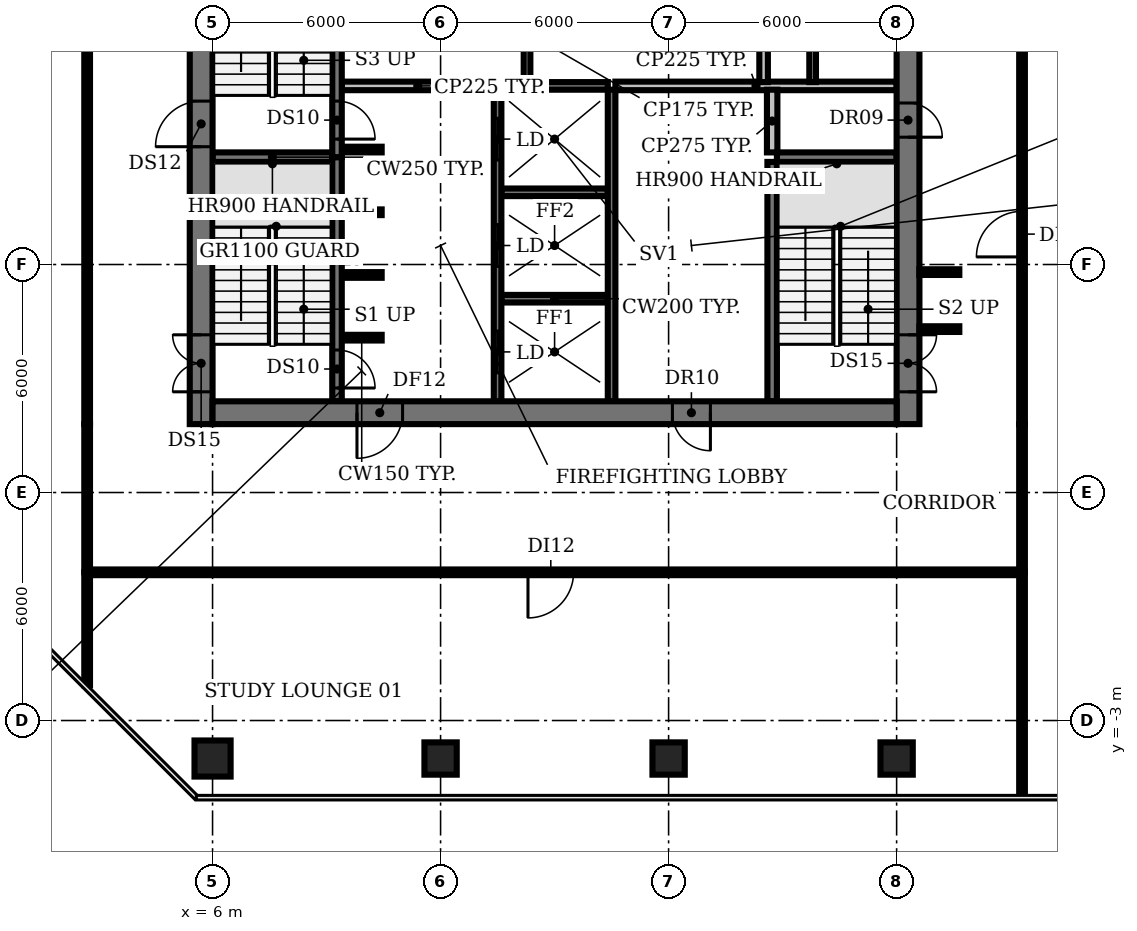
"""IFC4 building model, lengths in metres.
Left out: names, types, materials, properties, quantities, classifications, styles, units other than length and angle.
Written with IfcOpenShell. Run it as: python <this file> out.ifc"""

import sys

from ifc_helpers import new_model, si_unit, direction, frame, frame_2d, origin, origin_2d, place, context, subcontext, project, spatial, rectangle, circle, extrude, element, fill, save


model = new_model("IFC4")
c1 = context("Model", 3, precision=1e-05, world=origin(), true_north=direction((0.0, 1.0)))
c2 = subcontext(c1, "Body", "Model", "MODEL_VIEW")
j1 = project(units=[si_unit("LENGTHUNIT", "METRE"), si_unit("PLANEANGLEUNIT", "RADIAN")], contexts=[c1])
p1 = place(None, origin())
s1 = spatial("IfcSite", under=j1, at=p1, CompositionType="ELEMENT")
p2 = place(p1, origin())
s2 = spatial("IfcBuilding", under=s1, at=p2, CompositionType="ELEMENT")
p3 = place(p2, frame((0.0, 0.0, 180.2)))
s3 = spatial("IfcBuildingStorey", under=s2, at=p3, CompositionType="ELEMENT", Elevation=180.2)
p4 = place(p3, frame((6.0, -4.0, 0.0), z_axis=(0.0, 0.0, 1.0), x_axis=(1.0, 0.0, 0.0)))
e1 = element("IfcColumn", 1, at=p4, inside=s3, PredefinedType="COLUMN", context=c2, shape_type="SweptSolid", body=[
    extrude(circle(Radius=0.475, at=origin_2d()), origin(), (0.0, 0.0, 1.0), 3.85),
])
for number, where, z_axis, x_axis in (
    (2, (12.0, -4.0, 0.0), (0.0, 0.0, 1.0), (1.0, 0.0, 0.0)),
    (3, (18.0, -4.0, 0.0), (0.0, 0.0, 1.0), (1.0, 0.0, 0.0)),
    (4, (24.0, -4.0, 0.0), (0.0, 0.0, 1.0), (1.0, 0.0, 0.0)),
):
    element("IfcColumn", number, at=place(p3, frame(where, z_axis=z_axis, x_axis=x_axis)), inside=s3, PredefinedType="COLUMN", context=c2, shape_type="SweptSolid", body=[
        extrude(rectangle(XDim=0.85, YDim=0.85, at=origin_2d()), origin(), (0.0, 0.0, 1.0), 3.85),
    ])
p5 = place(p3, frame((9.4, 7.075, 0.0), z_axis=(0.0, 0.0, 1.0), x_axis=(1.0, 0.0, 0.0)))
e5 = element("IfcWall", 5, at=p5, inside=s3, PredefinedType="SHEAR", context=c2, shape_type="SweptSolid", body=[
    extrude(rectangle(XDim=1.05, YDim=0.15, at=frame_2d((0.525, 0.0))), origin(), (0.0, 0.0, 1.0), 3.85),
])
p6 = place(p3, frame((13.6, 8.1, 0.0), z_axis=(0.0, 0.0, 1.0), x_axis=(1.0, 0.0, 0.0)))
e6 = element("IfcWall", 6, at=p6, inside=s3, PredefinedType="SHEAR", context=c2, shape_type="SweptSolid", body=[
    extrude(rectangle(XDim=2.8, YDim=0.2, at=frame_2d((1.4, 0.0))), origin(), (0.0, 0.0, 1.0), 3.85),
])
for number, where, z_axis, x_axis in (
    (7, (9.4, 8.725, 0.0), (0.0, 0.0, 1.0), (1.0, 0.0, 0.0)),
    (8, (9.4, 10.375, 0.0), (0.0, 0.0, 1.0), (1.0, 0.0, 0.0)),
):
    element("IfcWall", number, at=place(p3, frame(where, z_axis=z_axis, x_axis=x_axis)), inside=s3, PredefinedType="SHEAR", context=c2, shape_type="SweptSolid", body=[
        extrude(rectangle(XDim=1.05, YDim=0.15, at=frame_2d((0.525, 0.0))), origin(), (0.0, 0.0, 1.0), 3.85),
    ])
p7 = place(p3, frame((13.6, 10.9, 0.0), z_axis=(0.0, 0.0, 1.0), x_axis=(1.0, 0.0, 0.0)))
e9 = element("IfcWall", 9, at=p7, inside=s3, PredefinedType="SHEAR", context=c2, shape_type="SweptSolid", body=[
    extrude(rectangle(XDim=2.8, YDim=0.2, at=frame_2d((1.4, 0.0))), origin(), (0.0, 0.0, 1.0), 3.85),
])
for number, where, z_axis, x_axis in (
    (10, (6.0, 11.825, 0.0), (0.0, 0.0, 1.0), (1.0, 0.0, 0.0)),
    (11, (20.85, 11.825, 0.0), (0.0, 0.0, 1.0), (1.0, 0.0, 0.0)),
):
    element("IfcWall", number, at=place(p3, frame(where, z_axis=z_axis, x_axis=x_axis)), inside=s3, PredefinedType="SHEAR", context=c2, shape_type="SweptSolid", body=[
        extrude(rectangle(XDim=3.15, YDim=0.25, at=frame_2d((1.575, 0.0))), origin(), (0.0, 0.0, 1.0), 3.85),
    ])
p8 = place(p3, frame((9.4, 12.025, 0.0), z_axis=(0.0, 0.0, 1.0), x_axis=(1.0, 0.0, 0.0)))
e12 = element("IfcWall", 12, at=p8, inside=s3, PredefinedType="SHEAR", context=c2, shape_type="SweptSolid", body=[
    extrude(rectangle(XDim=1.05, YDim=0.15, at=frame_2d((0.525, 0.0))), origin(), (0.0, 0.0, 1.0), 3.85),
])
p9 = place(p3, frame((9.4, 13.7, 0.0), z_axis=(0.0, 0.0, 1.0), x_axis=(1.0, 0.0, 0.0)))
e13 = element("IfcWall", 13, at=p9, inside=s3, PredefinedType="PARTITIONING", context=c2, shape_type="SweptSolid", body=[
    extrude(rectangle(XDim=4.0, YDim=0.225, at=frame_2d((2.0, 0.0))), origin(), (0.0, 0.0, 1.0), 3.85),
])
p10 = place(p3, frame((13.6, 13.7, 0.0), z_axis=(0.0, 0.0, 1.0), x_axis=(1.0, 0.0, 0.0)))
e14 = element("IfcWall", 14, at=p10, inside=s3, PredefinedType="SHEAR", context=c2, shape_type="SweptSolid", body=[
    extrude(rectangle(XDim=2.8, YDim=0.2, at=frame_2d((1.4, 0.0))), origin(), (0.0, 0.0, 1.0), 3.85),
])
p11 = place(p3, frame((16.6, 13.7, 0.0), z_axis=(0.0, 0.0, 1.0), x_axis=(1.0, 0.0, 0.0)))
e15 = element("IfcWall", 15, at=p11, inside=s3, PredefinedType="PARTITIONING", context=c2, shape_type="SweptSolid", body=[
    extrude(rectangle(XDim=7.4, YDim=0.225, at=frame_2d((3.7, 0.0))), origin(), (0.0, 0.0, 1.0), 3.85),
])
p12 = place(p3, frame((9.275, 11.825, 0.0), z_axis=(0.0, 0.0, 1.0), x_axis=(0.0, -1.0, 0.0)))
e16 = element("IfcWall", 16, at=p12, inside=s3, PredefinedType="SHEAR", context=c2, shape_type="SweptSolid", body=[
    extrude(rectangle(XDim=6.425, YDim=0.25, at=frame_2d((3.212, 0.0))), origin(), (0.0, 0.0, 1.0), 3.85),
])
p13 = place(p12, frame((5.075, 0.0, 0.0)))
e17 = element("IfcOpeningElement", 17, at=p13, cuts=e16, PredefinedType="OPENING", context=c2, shape_type="SweptSolid", body=[
    extrude(rectangle(XDim=1.0, YDim=2.1, at=frame_2d((0.5, 1.05))), frame((0.0, 0.135, 0.0), z_axis=(0.0, -1.0, 0.0), x_axis=(1.0, 0.0, 0.0)), (0.0, 0.0, 1.0), 0.27),
])
p14 = place(p3, frame((9.275, 18.375, 0.0), z_axis=(0.0, 0.0, 1.0), x_axis=(0.0, -1.0, 0.0)))
e18 = element("IfcWall", 18, at=p14, inside=s3, PredefinedType="SHEAR", context=c2, shape_type="SweptSolid", body=[
    extrude(rectangle(XDim=6.55, YDim=0.25, at=frame_2d((3.275, 0.0))), origin(), (0.0, 0.0, 1.0), 3.85),
])
p15 = place(p14, frame((5.075, 0.0, 0.0)))
e19 = element("IfcOpeningElement", 19, at=p15, cuts=e18, PredefinedType="OPENING", context=c2, shape_type="SweptSolid", body=[
    extrude(rectangle(XDim=1.0, YDim=2.1, at=frame_2d((0.5, 1.05))), frame((0.0, 0.135, 0.0), z_axis=(0.0, -1.0, 0.0), x_axis=(1.0, 0.0, 0.0)), (0.0, 0.0, 1.0), 0.27),
])
p16 = place(p3, frame((13.5, 5.4, 0.0), z_axis=(0.0, 0.0, 1.0), x_axis=(0.0, 1.0, 0.0)))
e20 = element("IfcWall", 20, at=p16, inside=s3, PredefinedType="SHEAR", context=c2, shape_type="SweptSolid", body=[
    extrude(rectangle(XDim=8.2, YDim=0.2, at=frame_2d((4.1, 0.0))), origin(), (0.0, 0.0, 1.0), 3.85),
])
p17 = place(p16, frame((0.75, 0.0, 0.0)))
e21 = element("IfcOpeningElement", 21, at=p17, cuts=e20, PredefinedType="OPENING", context=c2, shape_type="SweptSolid", body=[
    extrude(rectangle(XDim=1.1, YDim=2.1, at=frame_2d((0.55, 1.05))), frame((0.0, 0.11, 0.0), z_axis=(0.0, -1.0, 0.0), x_axis=(1.0, 0.0, 0.0)), (0.0, 0.0, 1.0), 0.22),
])
p18 = place(p16, frame((3.55, 0.0, 0.0)))
e22 = element("IfcOpeningElement", 22, at=p18, cuts=e20, PredefinedType="OPENING", context=c2, shape_type="SweptSolid", body=[
    extrude(rectangle(XDim=1.1, YDim=2.1, at=frame_2d((0.55, 1.05))), frame((0.0, 0.11, 0.0), z_axis=(0.0, -1.0, 0.0), x_axis=(1.0, 0.0, 0.0)), (0.0, 0.0, 1.0), 0.22),
])
p19 = place(p16, frame((6.35, 0.0, 0.0)))
e23 = element("IfcOpeningElement", 23, at=p19, cuts=e20, PredefinedType="OPENING", context=c2, shape_type="SweptSolid", body=[
    extrude(rectangle(XDim=1.1, YDim=2.1, at=frame_2d((0.55, 1.05))), frame((0.0, 0.11, 0.0), z_axis=(0.0, -1.0, 0.0), x_axis=(1.0, 0.0, 0.0)), (0.0, 0.0, 1.0), 0.22),
])
p20 = place(p3, frame((14.275, 13.8, 0.0), z_axis=(0.0, 0.0, 1.0), x_axis=(0.0, 1.0, 0.0)))
e24 = element("IfcWall", 24, at=p20, inside=s3, PredefinedType="PARTITIONING", context=c2, shape_type="SweptSolid", body=[
    extrude(rectangle(XDim=2.6, YDim=0.175, at=frame_2d((1.3, 0.0))), origin(), (0.0, 0.0, 1.0), 3.85),
])
p21 = place(p3, frame((16.5, 5.4, 0.0), z_axis=(0.0, 0.0, 1.0), x_axis=(0.0, 1.0, 0.0)))
e25 = element("IfcWall", 25, at=p21, inside=s3, PredefinedType="SHEAR", context=c2, shape_type="SweptSolid", body=[
    extrude(rectangle(XDim=8.2, YDim=0.2, at=frame_2d((4.1, 0.0))), origin(), (0.0, 0.0, 1.0), 3.85),
])
p22 = place(p3, frame((20.5, 13.8, 0.0), z_axis=(0.0, 0.0, 1.0), x_axis=(0.0, 1.0, 0.0)))
e26 = element("IfcWall", 26, at=p22, inside=s3, PredefinedType="PARTITIONING", context=c2, shape_type="SweptSolid", body=[
    extrude(rectangle(XDim=2.6, YDim=0.225, at=frame_2d((1.3, 0.0))), origin(), (0.0, 0.0, 1.0), 3.85),
])
p23 = place(p3, frame((20.725, 5.4, 0.0), z_axis=(0.0, 0.0, 1.0), x_axis=(0.0, 1.0, 0.0)))
e27 = element("IfcWall", 27, at=p23, inside=s3, PredefinedType="SHEAR", context=c2, shape_type="SweptSolid", body=[
    extrude(rectangle(XDim=6.3, YDim=0.25, at=frame_2d((3.15, 0.0))), origin(), (0.0, 0.0, 1.0), 3.85),
])
p24 = place(p3, frame((20.725, 11.95, 0.0), z_axis=(0.0, 0.0, 1.0), x_axis=(0.0, 1.0, 0.0)))
e28 = element("IfcWall", 28, at=p24, inside=s3, PredefinedType="PARTITIONING", context=c2, shape_type="SweptSolid", body=[
    extrude(rectangle(XDim=1.65, YDim=0.275, at=frame_2d((0.825, 0.0))), origin(), (0.0, 0.0, 1.0), 3.85),
])
p25 = place(p3, frame((21.79, 13.8, 0.0), z_axis=(0.0, 0.0, 1.0), x_axis=(0.0, 1.0, 0.0)))
e29 = element("IfcWall", 29, at=p25, inside=s3, PredefinedType="PARTITIONING", context=c2, shape_type="SweptSolid", body=[
    extrude(rectangle(XDim=2.6, YDim=0.175, at=frame_2d((1.3, 0.0))), origin(), (0.0, 0.0, 1.0), 3.85),
])
p26 = place(p3, frame((5.7, 4.8, 0.0), z_axis=(0.0, 0.0, 1.0), x_axis=(0.0, 1.0, 0.0)))
e30 = element("IfcWall", 30, at=p26, inside=s3, PredefinedType="SHEAR", context=c2, shape_type="SweptSolid", body=[
    extrude(rectangle(XDim=20.6, YDim=0.6, at=frame_2d((10.3, 0.0))), origin(), (0.0, 0.0, 1.0), 3.85),
])
p27 = place(p26, frame((0.85, 0.0, 0.0)))
e31 = element("IfcOpeningElement", 31, at=p27, cuts=e30, PredefinedType="OPENING", context=c2, shape_type="SweptSolid", body=[
    extrude(rectangle(XDim=1.5, YDim=2.1, at=frame_2d((0.75, 1.05))), frame((0.0, 0.31, 0.0), z_axis=(0.0, -1.0, 0.0), x_axis=(1.0, 0.0, 0.0)), (0.0, 0.0, 1.0), 0.62),
])
p28 = place(p26, frame((7.3, 0.0, 0.0)))
e32 = element("IfcOpeningElement", 32, at=p28, cuts=e30, PredefinedType="OPENING", context=c2, shape_type="SweptSolid", body=[
    extrude(rectangle(XDim=1.2, YDim=2.1, at=frame_2d((0.6, 1.05))), frame((0.0, 0.31, 0.0), z_axis=(0.0, -1.0, 0.0), x_axis=(1.0, 0.0, 0.0)), (0.0, 0.0, 1.0), 0.62),
])
p29 = place(p26, frame((13.85, 0.0, 0.0)))
e33 = element("IfcOpeningElement", 33, at=p29, cuts=e30, PredefinedType="OPENING", context=c2, shape_type="SweptSolid", body=[
    extrude(rectangle(XDim=1.2, YDim=2.1, at=frame_2d((0.6, 1.05))), frame((0.0, 0.31, 0.0), z_axis=(0.0, -1.0, 0.0), x_axis=(1.0, 0.0, 0.0)), (0.0, 0.0, 1.0), 0.62),
])
p30 = place(p3, frame((24.3, 25.555, 0.0), z_axis=(0.0, 0.0, 1.0), x_axis=(0.0, -1.0, 0.0)))
e34 = element("IfcWall", 34, at=p30, inside=s3, PredefinedType="SHEAR", context=c2, shape_type="SweptSolid", body=[
    extrude(rectangle(XDim=20.755, YDim=0.6, at=frame_2d((10.377, 0.0))), origin(), (0.0, 0.0, 1.0), 3.85),
])
p31 = place(p30, frame((18.405, 0.0, 0.0)))
e35 = element("IfcOpeningElement", 35, at=p31, cuts=e34, PredefinedType="OPENING", context=c2, shape_type="SweptSolid", body=[
    extrude(rectangle(XDim=1.5, YDim=2.1, at=frame_2d((0.75, 1.05))), frame((0.0, 0.31, 0.0), z_axis=(0.0, -1.0, 0.0), x_axis=(1.0, 0.0, 0.0)), (0.0, 0.0, 1.0), 0.62),
])
p32 = place(p30, frame((12.305, 0.0, 0.0)))
e36 = element("IfcOpeningElement", 36, at=p32, cuts=e34, PredefinedType="OPENING", context=c2, shape_type="SweptSolid", body=[
    extrude(rectangle(XDim=0.9, YDim=2.1, at=frame_2d((0.45, 1.05))), frame((0.0, 0.31, 0.0), z_axis=(0.0, -1.0, 0.0), x_axis=(1.0, 0.0, 0.0)), (0.0, 0.0, 1.0), 0.62),
])
p33 = place(p30, frame((6.305, 0.0, 0.0)))
e37 = element("IfcOpeningElement", 37, at=p33, cuts=e34, PredefinedType="OPENING", context=c2, shape_type="SweptSolid", body=[
    extrude(rectangle(XDim=2.0, YDim=2.1, at=frame_2d((1.0, 1.05))), frame((0.0, 0.31, 0.0), z_axis=(0.0, -1.0, 0.0), x_axis=(1.0, 0.0, 0.0)), (0.0, 0.0, 1.0), 0.62),
])
p34 = place(p3, frame((24.0, 5.1, 0.0), z_axis=(0.0, 0.0, 1.0), x_axis=(-1.0, 0.0, 0.0)))
e38 = element("IfcWall", 38, at=p34, inside=s3, PredefinedType="SHEAR", context=c2, shape_type="SweptSolid", body=[
    extrude(rectangle(XDim=18.0, YDim=0.6, at=frame_2d((9.0, 0.0))), origin(), (0.0, 0.0, 1.0), 3.85),
])
p35 = place(p34, frame((13.0, 0.0, 0.0)))
e39 = element("IfcOpeningElement", 39, at=p35, cuts=e38, PredefinedType="OPENING", context=c2, shape_type="SweptSolid", body=[
    extrude(rectangle(XDim=1.2, YDim=2.1, at=frame_2d((0.6, 1.05))), frame((0.0, 0.31, 0.0), z_axis=(0.0, -1.0, 0.0), x_axis=(1.0, 0.0, 0.0)), (0.0, 0.0, 1.0), 0.62),
])
p36 = place(p34, frame((4.9, 0.0, 0.0)))
e40 = element("IfcOpeningElement", 40, at=p36, cuts=e38, PredefinedType="OPENING", context=c2, shape_type="SweptSolid", body=[
    extrude(rectangle(XDim=1.0, YDim=2.1, at=frame_2d((0.5, 1.05))), frame((0.0, 0.31, 0.0), z_axis=(0.0, -1.0, 0.0), x_axis=(1.0, 0.0, 0.0)), (0.0, 0.0, 1.0), 0.62),
])
p37 = place(p3, frame((2.7, -2.072, 0.0), z_axis=(0.0, 0.0, 1.0), x_axis=(0.0, 1.0, 0.0)))
e41 = element("IfcWall", 41, at=p37, inside=s3, PredefinedType="PARTITIONING", context=c2, shape_type="SweptSolid", body=[
    extrude(rectangle(XDim=2.972, YDim=0.15, at=frame_2d((1.486, 0.0))), origin(), (0.0, 0.0, 1.0), 2.88),
])
p38 = place(p3, frame((2.7, 0.9, 0.0), z_axis=(0.0, 0.0, 1.0), x_axis=(0.0, 1.0, 0.0)))
e42 = element("IfcWall", 42, at=p38, inside=s3, PredefinedType="PARTITIONING", context=c2, shape_type="SweptSolid", body=[
    extrude(rectangle(XDim=3.9, YDim=0.15, at=frame_2d((1.95, 0.0))), origin(), (0.0, 0.0, 1.0), 2.88),
])
p39 = place(p3, frame((2.7, 4.8, 0.0), z_axis=(0.0, 0.0, 1.0), x_axis=(0.0, 1.0, 0.0)))
e43 = element("IfcWall", 43, at=p39, inside=s3, PredefinedType="PARTITIONING", context=c2, shape_type="SweptSolid", body=[
    extrude(rectangle(XDim=20.6, YDim=0.15, at=frame_2d((10.3, 0.0))), origin(), (0.0, 0.0, 1.0), 2.88),
])
p40 = place(p39, frame((10.2, 0.0, 0.0)))
e44 = element("IfcOpeningElement", 44, at=p40, cuts=e43, PredefinedType="OPENING", context=c2, shape_type="SweptSolid", body=[
    extrude(rectangle(XDim=1.2, YDim=2.1, at=frame_2d((0.6, 1.05))), frame((0.0, 0.085, 0.0), z_axis=(0.0, -1.0, 0.0), x_axis=(1.0, 0.0, 0.0)), (0.0, 0.0, 1.0), 0.17),
])
for number, where, z_axis, x_axis in (
    (45, (24.6, 7.3, 0.0), (0.0, 0.0, 1.0), (1.0, 0.0, 0.0)),
    (46, (24.6, 8.8, 0.0), (0.0, 0.0, 1.0), (1.0, 0.0, 0.0)),
):
    element("IfcWall", number, at=place(p3, frame(where, z_axis=z_axis, x_axis=x_axis)), inside=s3, PredefinedType="PARTITIONING", context=c2, shape_type="SweptSolid", body=[
        extrude(rectangle(XDim=1.05, YDim=0.15, at=frame_2d((0.525, 0.0))), origin(), (0.0, 0.0, 1.0), 2.88),
    ])
p41 = place(p3, frame((27.3, -4.98, 0.0), z_axis=(0.0, 0.0, 1.0), x_axis=(0.0, 1.0, 0.0)))
e47 = element("IfcWall", 47, at=p41, inside=s3, PredefinedType="PARTITIONING", context=c2, shape_type="SweptSolid", body=[
    extrude(rectangle(XDim=5.88, YDim=0.15, at=frame_2d((2.94, 0.0))), origin(), (0.0, 0.0, 1.0), 2.88),
])
p42 = place(p3, frame((27.3, 0.9, 0.0), z_axis=(0.0, 0.0, 1.0), x_axis=(-1.0, 0.0, 0.0)))
e48 = element("IfcWall", 48, at=p42, inside=s3, PredefinedType="PARTITIONING", context=c2, shape_type="SweptSolid", body=[
    extrude(rectangle(XDim=24.6, YDim=0.15, at=frame_2d((12.3, 0.0))), origin(), (0.0, 0.0, 1.0), 2.88),
])
p43 = place(p42, frame((11.8, 0.0, 0.0)))
e49 = element("IfcOpeningElement", 49, at=p43, cuts=e48, PredefinedType="OPENING", context=c2, shape_type="SweptSolid", body=[
    extrude(rectangle(XDim=1.2, YDim=2.1, at=frame_2d((0.6, 1.05))), frame((0.0, 0.085, 0.0), z_axis=(0.0, -1.0, 0.0), x_axis=(1.0, 0.0, 0.0)), (0.0, 0.0, 1.0), 0.17),
])
p44 = place(p3, frame((27.3, 0.9, 0.0), z_axis=(0.0, 0.0, 1.0), x_axis=(0.0, 1.0, 0.0)))
e50 = element("IfcWall", 50, at=p44, inside=s3, PredefinedType="PARTITIONING", context=c2, shape_type="SweptSolid", body=[
    extrude(rectangle(XDim=3.9, YDim=0.15, at=frame_2d((1.95, 0.0))), origin(), (0.0, 0.0, 1.0), 2.88),
])
p45 = place(p3, frame((27.3, 4.8, 0.0), z_axis=(0.0, 0.0, 1.0), x_axis=(0.0, 1.0, 0.0)))
e51 = element("IfcWall", 51, at=p45, inside=s3, PredefinedType="PARTITIONING", context=c2, shape_type="SweptSolid", body=[
    extrude(rectangle(XDim=10.0, YDim=0.15, at=frame_2d((5.0, 0.0))), origin(), (0.0, 0.0, 1.0), 2.88),
])
p46 = place(p45, frame((4.4, 0.0, 0.0)))
e52 = element("IfcOpeningElement", 52, at=p46, cuts=e51, PredefinedType="OPENING", context=c2, shape_type="SweptSolid", body=[
    extrude(rectangle(XDim=1.2, YDim=2.1, at=frame_2d((0.6, 1.05))), frame((0.0, 0.085, 0.0), z_axis=(0.0, -1.0, 0.0), x_axis=(1.0, 0.0, 0.0)), (0.0, 0.0, 1.0), 0.17),
])
p47 = place(p13, origin())
e53 = element("IfcDoor", 53, at=p47, inside=s3, OperationType="SINGLE_SWING_RIGHT", PredefinedType="DOOR", context=c2, shape_type="SweptSolid", body=[
    extrude(rectangle(XDim=1.0, YDim=2.1, at=frame_2d((0.5, 1.05))), frame((0.0, 0.025, 0.0), z_axis=(0.0, -1.0, 0.0), x_axis=(1.0, 0.0, 0.0)), (0.0, 0.0, 1.0), 0.05),
])
fill(e17, e53)
p48 = place(p15, origin())
e54 = element("IfcDoor", 54, at=p48, inside=s3, OperationType="SINGLE_SWING_RIGHT", PredefinedType="DOOR", context=c2, shape_type="SweptSolid", body=[
    extrude(rectangle(XDim=1.0, YDim=2.1, at=frame_2d((0.5, 1.05))), frame((0.0, 0.025, 0.0), z_axis=(0.0, -1.0, 0.0), x_axis=(1.0, 0.0, 0.0)), (0.0, 0.0, 1.0), 0.05),
])
fill(e19, e54)
p49 = place(p17, origin())
e55 = element("IfcDoor", 55, at=p49, inside=s3, OperationType="DOUBLE_DOOR_SLIDING", PredefinedType="DOOR", context=c2, shape_type="SweptSolid", body=[
    extrude(rectangle(XDim=1.1, YDim=2.1, at=frame_2d((0.55, 1.05))), frame((0.0, 0.025, 0.0), z_axis=(0.0, -1.0, 0.0), x_axis=(1.0, 0.0, 0.0)), (0.0, 0.0, 1.0), 0.05),
])
fill(e21, e55)
p50 = place(p18, origin())
e56 = element("IfcDoor", 56, at=p50, inside=s3, OperationType="DOUBLE_DOOR_SLIDING", PredefinedType="DOOR", context=c2, shape_type="SweptSolid", body=[
    extrude(rectangle(XDim=1.1, YDim=2.1, at=frame_2d((0.55, 1.05))), frame((0.0, 0.025, 0.0), z_axis=(0.0, -1.0, 0.0), x_axis=(1.0, 0.0, 0.0)), (0.0, 0.0, 1.0), 0.05),
])
fill(e22, e56)
p51 = place(p19, origin())
e57 = element("IfcDoor", 57, at=p51, inside=s3, OperationType="DOUBLE_DOOR_SLIDING", PredefinedType="DOOR", context=c2, shape_type="SweptSolid", body=[
    extrude(rectangle(XDim=1.1, YDim=2.1, at=frame_2d((0.55, 1.05))), frame((0.0, 0.025, 0.0), z_axis=(0.0, -1.0, 0.0), x_axis=(1.0, 0.0, 0.0)), (0.0, 0.0, 1.0), 0.05),
])
fill(e23, e57)
p52 = place(p27, origin())
e58 = element("IfcDoor", 58, at=p52, inside=s3, OperationType="DOUBLE_DOOR_SINGLE_SWING", PredefinedType="DOOR", context=c2, shape_type="SweptSolid", body=[
    extrude(rectangle(XDim=1.5, YDim=2.1, at=frame_2d((0.75, 1.05))), frame((0.0, 0.025, 0.0), z_axis=(0.0, -1.0, 0.0), x_axis=(1.0, 0.0, 0.0)), (0.0, 0.0, 1.0), 0.05),
])
fill(e31, e58)
p53 = place(p28, origin())
e59 = element("IfcDoor", 59, at=p53, inside=s3, OperationType="SINGLE_SWING_LEFT", PredefinedType="DOOR", context=c2, shape_type="SweptSolid", body=[
    extrude(rectangle(XDim=1.2, YDim=2.1, at=frame_2d((0.6, 1.05))), frame((0.0, 0.025, 0.0), z_axis=(0.0, -1.0, 0.0), x_axis=(1.0, 0.0, 0.0)), (0.0, 0.0, 1.0), 0.05),
])
fill(e32, e59)
p54 = place(p31, origin())
e60 = element("IfcDoor", 60, at=p54, inside=s3, OperationType="DOUBLE_DOOR_SINGLE_SWING", PredefinedType="DOOR", context=c2, shape_type="SweptSolid", body=[
    extrude(rectangle(XDim=1.5, YDim=2.1, at=frame_2d((0.75, 1.05))), frame((0.0, 0.025, 0.0), z_axis=(0.0, -1.0, 0.0), x_axis=(1.0, 0.0, 0.0)), (0.0, 0.0, 1.0), 0.05),
])
fill(e35, e60)
p55 = place(p32, origin())
e61 = element("IfcDoor", 61, at=p55, inside=s3, OperationType="SINGLE_SWING_RIGHT", PredefinedType="DOOR", context=c2, shape_type="SweptSolid", body=[
    extrude(rectangle(XDim=0.9, YDim=2.1, at=frame_2d((0.45, 1.05))), frame((0.0, -0.24, 0.0), z_axis=(0.0, -1.0, 0.0), x_axis=(1.0, 0.0, 0.0)), (0.0, 0.0, 1.0), 0.05),
])
fill(e36, e61)
p56 = place(p35, origin())
e62 = element("IfcDoor", 62, at=p56, inside=s3, OperationType="SINGLE_SWING_RIGHT", PredefinedType="DOOR", context=c2, shape_type="SweptSolid", body=[
    extrude(rectangle(XDim=1.2, YDim=2.1, at=frame_2d((0.6, 1.05))), frame((0.0, 0.025, 0.0), z_axis=(0.0, -1.0, 0.0), x_axis=(1.0, 0.0, 0.0)), (0.0, 0.0, 1.0), 0.05),
])
fill(e39, e62)
p57 = place(p36, origin())
e63 = element("IfcDoor", 63, at=p57, inside=s3, OperationType="SINGLE_SWING_LEFT", PredefinedType="DOOR", context=c2, shape_type="SweptSolid", body=[
    extrude(rectangle(XDim=1.0, YDim=2.1, at=frame_2d((0.5, 1.05))), frame((0.0, -0.24, 0.0), z_axis=(0.0, -1.0, 0.0), x_axis=(1.0, 0.0, 0.0)), (0.0, 0.0, 1.0), 0.05),
])
fill(e40, e63)
p58 = place(p43, origin())
e64 = element("IfcDoor", 64, at=p58, inside=s3, OperationType="SINGLE_SWING_RIGHT", PredefinedType="DOOR", context=c2, shape_type="SweptSolid", body=[
    extrude(rectangle(XDim=1.2, YDim=2.1, at=frame_2d((0.6, 1.05))), frame((0.0, 0.025, 0.0), z_axis=(0.0, -1.0, 0.0), x_axis=(1.0, 0.0, 0.0)), (0.0, 0.0, 1.0), 0.05),
])
fill(e49, e64)
p59 = place(p46, origin())
e65 = element("IfcDoor", 65, at=p59, inside=s3, OperationType="SINGLE_SWING_LEFT", PredefinedType="DOOR", context=c2, shape_type="SweptSolid", body=[
    extrude(rectangle(XDim=1.2, YDim=2.1, at=frame_2d((0.6, 1.05))), frame((0.0, 0.025, 0.0), z_axis=(0.0, -1.0, 0.0), x_axis=(1.0, 0.0, 0.0)), (0.0, 0.0, 1.0), 0.05),
])
fill(e52, e65)
save(model, sys.argv[1])
